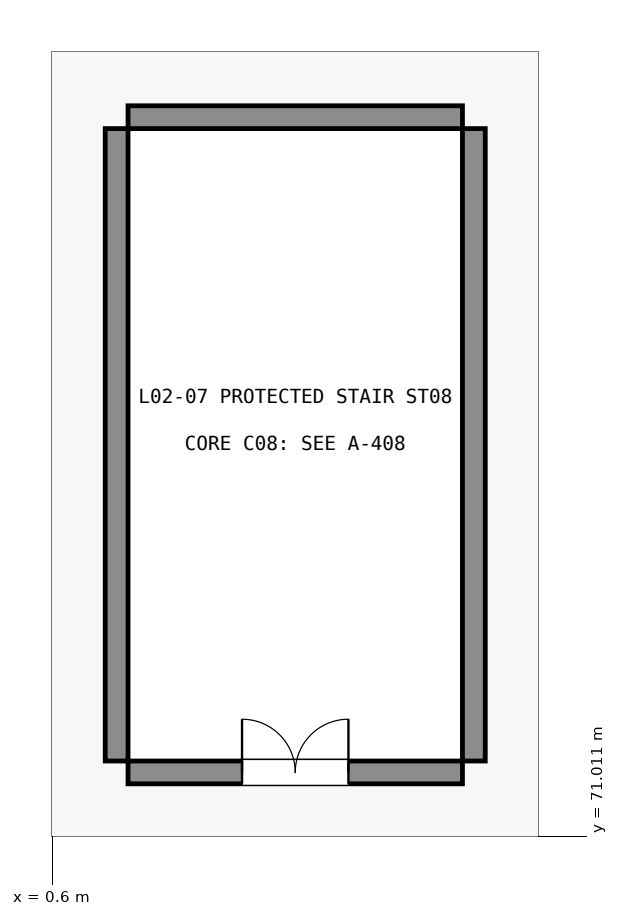
"""IFC4 building model, lengths in metres.
Left out: names, types, materials, properties, quantities, classifications, styles, units other than length and angle.
Written with IfcOpenShell. Run it as: python <this file> out.ifc"""

import sys

from ifc_helpers import new_model, si_unit, direction, frame, frame_2d, origin, place, context, subcontext, project, spatial, rectangle, extrude, element, fill, save


model = new_model("IFC4")
c1 = context("Model", 3, precision=1e-05, world=origin(), true_north=direction((0.0, 1.0)))
c2 = subcontext(c1, "Body", "Model", "MODEL_VIEW")
j1 = project(units=[si_unit("LENGTHUNIT", "METRE"), si_unit("PLANEANGLEUNIT", "RADIAN")], contexts=[c1])
p1 = place(None, origin())
s1 = spatial("IfcSite", under=j1, at=p1, CompositionType="ELEMENT")
p2 = place(p1, origin())
s2 = spatial("IfcBuilding", under=s1, at=p2, CompositionType="ELEMENT")
p3 = place(p2, frame((0.0, 0.0, 11.4)))
s3 = spatial("IfcBuildingStorey", under=s2, at=p3, CompositionType="ELEMENT", Elevation=11.4)
p4 = place(p3, frame((1.6, 71.85, 0.0), z_axis=(0.0, 0.0, 1.0), x_axis=(1.0, 0.0, 0.0)))
e1 = element("IfcWall", 1, at=p4, inside=s3, PredefinedType="SHEAR", context=c2, shape_type="SweptSolid", body=[
    extrude(rectangle(XDim=4.4, YDim=0.3, at=frame_2d((2.2, 0.0))), origin(), (0.0, 0.0, 1.0), 4.45),
])
p5 = place(p4, frame((1.5, 0.0, 0.0)))
e2 = element("IfcOpeningElement", 2, at=p5, cuts=e1, PredefinedType="OPENING", context=c2, shape_type="SweptSolid", body=[
    extrude(rectangle(XDim=1.4, YDim=2.2, at=frame_2d((0.7, 1.1))), frame((0.0, 0.16, 0.0), z_axis=(0.0, -1.0, 0.0), x_axis=(1.0, 0.0, 0.0)), (0.0, 0.0, 1.0), 0.32),
])
p6 = place(p3, frame((1.6, 80.47, 0.0), z_axis=(0.0, 0.0, 1.0), x_axis=(1.0, 0.0, 0.0)))
e3 = element("IfcWall", 3, at=p6, inside=s3, PredefinedType="SHEAR", context=c2, shape_type="SweptSolid", body=[
    extrude(rectangle(XDim=4.4, YDim=0.3, at=frame_2d((2.2, 0.0))), origin(), (0.0, 0.0, 1.0), 4.45),
])
for number, where, z_axis, x_axis in (
    (4, (1.45, 72.0, 0.0), (0.0, 0.0, 1.0), (0.0, 1.0, 0.0)),
    (5, (6.15, 72.0, 0.0), (0.0, 0.0, 1.0), (0.0, 1.0, 0.0)),
):
    element("IfcWall", number, at=place(p3, frame(where, z_axis=z_axis, x_axis=x_axis)), inside=s3, PredefinedType="SHEAR", context=c2, shape_type="SweptSolid", body=[
        extrude(rectangle(XDim=8.32, YDim=0.3, at=frame_2d((4.16, 0.0))), origin(), (0.0, 0.0, 1.0), 4.45),
    ])
p7 = place(p5, origin())
e6 = element("IfcDoor", 6, at=p7, inside=s3, OperationType="DOUBLE_DOOR_SINGLE_SWING", PredefinedType="DOOR", context=c2, shape_type="SweptSolid", body=[
    extrude(rectangle(XDim=1.4, YDim=2.2, at=frame_2d((0.7, 1.1))), frame((0.0, 0.025, 0.0), z_axis=(0.0, -1.0, 0.0), x_axis=(1.0, 0.0, 0.0)), (0.0, 0.0, 1.0), 0.05),
])
fill(e2, e6)
save(model, sys.argv[1])
